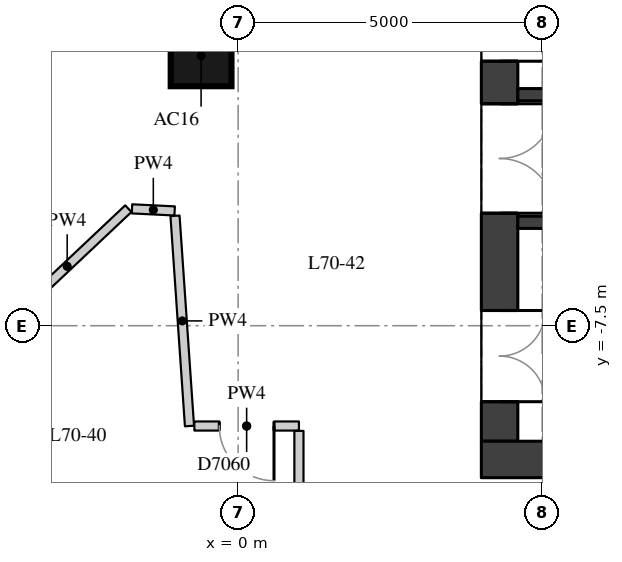
"""IFC4 building model, lengths in metres.
Left out: names, types, materials, properties, quantities, classifications, styles, units other than length and angle.
Written with IfcOpenShell. Run it as: python <this file> out.ifc"""

import sys

from ifc_helpers import new_model, si_unit, direction, frame, frame_2d, origin, origin_2d, place, context, subcontext, project, spatial, rectangle, extrude, element, fill, save


model = new_model("IFC4")
c1 = context("Model", 3, precision=1e-05, world=origin(), true_north=direction((0.0, 1.0)))
c2 = subcontext(c1, "Body", "Model", "MODEL_VIEW")
j1 = project(units=[si_unit("LENGTHUNIT", "METRE"), si_unit("PLANEANGLEUNIT", "RADIAN")], contexts=[c1])
p1 = place(None, origin())
s1 = spatial("IfcSite", under=j1, at=p1, CompositionType="ELEMENT")
p2 = place(p1, origin())
s2 = spatial("IfcBuilding", under=s1, at=p2, CompositionType="ELEMENT")
p3 = place(p2, frame((0.0, 0.0, 246.5)))
s3 = spatial("IfcBuildingStorey", under=s2, at=p3, CompositionType="ELEMENT", Elevation=246.5)
p4 = place(p3, frame((-0.609, -3.062, 0.0), z_axis=(0.0, 0.0, 1.0), x_axis=(1.0, 0.0, 0.0)))
e1 = element("IfcColumn", 1, at=p4, inside=s3, PredefinedType="COLUMN", context=c2, shape_type="SweptSolid", body=[
    extrude(rectangle(XDim=1.0, YDim=1.0, at=origin_2d()), origin(), (0.0, 0.0, 1.0), 3.3),
])
p5 = place(p3, frame((4.3, -9.4, 0.0), z_axis=(0.0, 0.0, 1.0), x_axis=(0.0, 1.0, 0.0)))
e2 = element("IfcWall", 2, at=p5, inside=s3, PredefinedType="SHEAR", context=c2, shape_type="SweptSolid", body=[
    extrude(rectangle(XDim=18.8, YDim=0.6, at=frame_2d((9.4, 0.0))), origin(), (0.0, 0.0, 1.0), 3.02),
])
p6 = place(p5, frame((0.65, 0.0, 0.0)))
e3 = element("IfcOpeningElement", 3, at=p6, cuts=e2, PredefinedType="OPENING", context=c2, shape_type="SweptSolid", body=[
    extrude(rectangle(XDim=1.5, YDim=2.1, at=frame_2d((0.75, 1.05))), frame((0.0, 0.31, 0.0), z_axis=(0.0, -1.0, 0.0), x_axis=(1.0, 0.0, 0.0)), (0.0, 0.0, 1.0), 0.62),
])
p7 = place(p5, frame((3.75, 0.0, 0.0)))
e4 = element("IfcOpeningElement", 4, at=p7, cuts=e2, PredefinedType="OPENING", context=c2, shape_type="SweptSolid", body=[
    extrude(rectangle(XDim=1.8, YDim=2.1, at=frame_2d((0.9, 1.05))), frame((0.0, 0.31, 0.0), z_axis=(0.0, -1.0, 0.0), x_axis=(1.0, 0.0, 0.0)), (0.0, 0.0, 1.0), 0.62),
])
p8 = place(p5, frame((6.25, 0.0, 0.0)))
e5 = element("IfcOpeningElement", 5, at=p8, cuts=e2, PredefinedType="OPENING", context=c2, shape_type="SweptSolid", body=[
    extrude(rectangle(XDim=1.1, YDim=2.1, at=frame_2d((0.55, 1.05))), frame((0.0, 0.31, 0.0), z_axis=(0.0, -1.0, 0.0), x_axis=(1.0, 0.0, 0.0)), (0.0, 0.0, 1.0), 0.62),
])
p9 = place(p5, frame((8.9, 0.0, 0.0)))
e6 = element("IfcOpeningElement", 6, at=p9, cuts=e2, PredefinedType="OPENING", context=c2, shape_type="SweptSolid", body=[
    extrude(rectangle(XDim=1.0, YDim=2.1, at=frame_2d((0.5, 1.05))), frame((0.0, 0.31, 0.0), z_axis=(0.0, -1.0, 0.0), x_axis=(1.0, 0.0, 0.0)), (0.0, 0.0, 1.0), 0.62),
])
p10 = place(p5, frame((11.45, 0.0, 0.0)))
e7 = element("IfcOpeningElement", 7, at=p10, cuts=e2, PredefinedType="OPENING", context=c2, shape_type="SweptSolid", body=[
    extrude(rectangle(XDim=1.1, YDim=2.1, at=frame_2d((0.55, 1.05))), frame((0.0, 0.31, 0.0), z_axis=(0.0, -1.0, 0.0), x_axis=(1.0, 0.0, 0.0)), (0.0, 0.0, 1.0), 0.62),
])
p11 = place(p5, frame((13.25, 0.0, 0.0)))
e8 = element("IfcOpeningElement", 8, at=p11, cuts=e2, PredefinedType="OPENING", context=c2, shape_type="SweptSolid", body=[
    extrude(rectangle(XDim=1.8, YDim=2.1, at=frame_2d((0.9, 1.05))), frame((0.0, 0.31, 0.0), z_axis=(0.0, -1.0, 0.0), x_axis=(1.0, 0.0, 0.0)), (0.0, 0.0, 1.0), 0.62),
])
p12 = place(p5, frame((16.65, 0.0, 0.0)))
e9 = element("IfcOpeningElement", 9, at=p12, cuts=e2, PredefinedType="OPENING", context=c2, shape_type="SweptSolid", body=[
    extrude(rectangle(XDim=1.5, YDim=2.1, at=frame_2d((0.75, 1.05))), frame((0.0, 0.31, 0.0), z_axis=(0.0, -1.0, 0.0), x_axis=(1.0, 0.0, 0.0)), (0.0, 0.0, 1.0), 0.62),
])
p13 = place(p3, frame((4.0, -9.7, 0.0), z_axis=(0.0, 0.0, 1.0), x_axis=(1.0, 0.0, 0.0)))
e10 = element("IfcWall", 10, at=p13, inside=s3, PredefinedType="SHEAR", context=c2, shape_type="SweptSolid", body=[
    extrude(rectangle(XDim=12.0, YDim=0.6, at=frame_2d((6.0, 0.0))), origin(), (0.0, 0.0, 1.0), 3.02),
])
p14 = place(p3, frame((4.6, -3.7, 0.0), z_axis=(0.0, 0.0, 1.0), x_axis=(1.0, 0.0, 0.0)))
e11 = element("IfcWall", 11, at=p14, inside=s3, PredefinedType="SHEAR", context=c2, shape_type="SweptSolid", body=[
    extrude(rectangle(XDim=10.8, YDim=0.2, at=frame_2d((5.4, 0.0))), origin(), (0.0, 0.0, 1.0), 3.02),
])
p15 = place(p14, frame((6.6, 0.0, 0.0)))
e12 = element("IfcOpeningElement", 12, at=p15, cuts=e11, PredefinedType="OPENING", context=c2, shape_type="SweptSolid", body=[
    extrude(rectangle(XDim=1.1, YDim=2.1, at=frame_2d((0.55, 1.05))), frame((0.0, 0.11, 0.0), z_axis=(0.0, -1.0, 0.0), x_axis=(1.0, 0.0, 0.0)), (0.0, 0.0, 1.0), 0.22),
])
p16 = place(p14, frame((8.9, 0.0, 0.0)))
e13 = element("IfcOpeningElement", 13, at=p16, cuts=e11, PredefinedType="OPENING", context=c2, shape_type="SweptSolid", body=[
    extrude(rectangle(XDim=1.1, YDim=2.1, at=frame_2d((0.55, 1.05))), frame((0.0, 0.11, 0.0), z_axis=(0.0, -1.0, 0.0), x_axis=(1.0, 0.0, 0.0)), (0.0, 0.0, 1.0), 0.22),
])
p17 = place(p3, frame((4.6, -5.8, 0.0), z_axis=(0.0, 0.0, 1.0), x_axis=(1.0, 0.0, 0.0)))
e14 = element("IfcWall", 14, at=p17, inside=s3, PredefinedType="SHEAR", context=c2, shape_type="SweptSolid", body=[
    extrude(rectangle(XDim=10.8, YDim=0.2, at=frame_2d((5.4, 0.0))), origin(), (0.0, 0.0, 1.0), 3.02),
])
p18 = place(p3, frame((-3.817, -7.472, 0.0), z_axis=(0.0, 0.0, 1.0), x_axis=(0.727554143834, 0.686050266227, 0.0)))
e15 = element("IfcWall", 15, at=p18, inside=s3, PredefinedType="PARTITIONING", context=c2, shape_type="SweptSolid", body=[
    extrude(rectangle(XDim=2.765, YDim=0.15, at=frame_2d((1.382, 0.0))), origin(), (0.0, 0.0, 1.0), 3.02),
])
p19 = place(p3, frame((-1.746, -5.578, 0.0), z_axis=(0.0, 0.0, 1.0), x_axis=(0.998798699726, -0.049001606354, 0.0)))
e16 = element("IfcWall", 16, at=p19, inside=s3, PredefinedType="PARTITIONING", context=c2, shape_type="SweptSolid", body=[
    extrude(rectangle(XDim=0.702, YDim=0.15, at=frame_2d((0.351, 0.0))), origin(), (0.0, 0.0, 1.0), 3.02),
])
p20 = place(p3, frame((-1.038, -5.693, 0.0), z_axis=(0.0, 0.0, 1.0), x_axis=(0.068688454557, -0.997638158959, 0.0)))
e17 = element("IfcWall", 17, at=p20, inside=s3, PredefinedType="PARTITIONING", context=c2, shape_type="SweptSolid", body=[
    extrude(rectangle(XDim=3.466, YDim=0.15, at=frame_2d((1.733, 0.0))), origin(), (0.0, 0.0, 1.0), 3.02),
])
p21 = place(p3, frame((-0.72, -9.15, 0.0), z_axis=(0.0, 0.0, 1.0), x_axis=(1.0, 0.0, 0.0)))
e18 = element("IfcWall", 18, at=p21, inside=s3, PredefinedType="PARTITIONING", context=c2, shape_type="SweptSolid", body=[
    extrude(rectangle(XDim=1.72, YDim=0.15, at=frame_2d((0.86, 0.0))), origin(), (0.0, 0.0, 1.0), 3.02),
])
p22 = place(p21, frame((0.41, 0.0, 0.0)))
e19 = element("IfcOpeningElement", 19, at=p22, cuts=e18, PredefinedType="OPENING", context=c2, shape_type="SweptSolid", body=[
    extrude(rectangle(XDim=0.9, YDim=2.1, at=frame_2d((0.45, 1.05))), frame((0.0, 0.085, 0.0), z_axis=(0.0, -1.0, 0.0), x_axis=(1.0, 0.0, 0.0)), (0.0, 0.0, 1.0), 0.17),
])
p23 = place(p3, frame((1.0, -9.23, 0.0), z_axis=(0.0, 0.0, 1.0), x_axis=(0.0, -1.0, 0.0)))
e20 = element("IfcWall", 20, at=p23, inside=s3, PredefinedType="PARTITIONING", context=c2, shape_type="SweptSolid", body=[
    extrude(rectangle(XDim=2.283, YDim=0.15, at=frame_2d((1.142, 0.0))), origin(), (0.0, 0.0, 1.0), 3.02),
])
p24 = place(p3, frame((-2.446, 0.0, 0.0), z_axis=(0.0, 0.0, 1.0), x_axis=(-0.382730523909, -0.923860025149, 0.0)))
e21 = element("IfcWall", 21, at=p24, inside=s3, PredefinedType="PARTITIONING", context=c2, shape_type="SweptSolid", body=[
    extrude(rectangle(XDim=4.251, YDim=0.1, at=frame_2d((2.125, 0.0))), origin(), (0.0, 0.0, 1.0), 3.02),
])
p25 = place(p6, origin())
e22 = element("IfcDoor", 22, at=p25, inside=s3, OperationType="DOUBLE_DOOR_SINGLE_SWING", PredefinedType="DOOR", context=c2, shape_type="SweptSolid", body=[
    extrude(rectangle(XDim=1.5, YDim=2.1, at=frame_2d((0.75, 1.05))), frame((0.0, 0.025, 0.0), z_axis=(0.0, -1.0, 0.0), x_axis=(1.0, 0.0, 0.0)), (0.0, 0.0, 1.0), 0.05),
])
fill(e3, e22)
p26 = place(p7, origin())
e23 = element("IfcDoor", 23, at=p26, inside=s3, OperationType="DOUBLE_DOOR_SINGLE_SWING", PredefinedType="DOOR", context=c2, shape_type="SweptSolid", body=[
    extrude(rectangle(XDim=1.8, YDim=2.1, at=frame_2d((0.9, 1.05))), frame((0.0, 0.025, 0.0), z_axis=(0.0, -1.0, 0.0), x_axis=(1.0, 0.0, 0.0)), (0.0, 0.0, 1.0), 0.05),
])
fill(e4, e23)
p27 = place(p8, origin())
e24 = element("IfcDoor", 24, at=p27, inside=s3, OperationType="SINGLE_SWING_RIGHT", PredefinedType="DOOR", context=c2, shape_type="SweptSolid", body=[
    extrude(rectangle(XDim=1.1, YDim=2.1, at=frame_2d((0.55, 1.05))), frame((0.0, 0.025, 0.0), z_axis=(0.0, -1.0, 0.0), x_axis=(1.0, 0.0, 0.0)), (0.0, 0.0, 1.0), 0.05),
])
fill(e5, e24)
p28 = place(p22, origin())
e25 = element("IfcDoor", 25, at=p28, inside=s3, OperationType="SINGLE_SWING_LEFT", PredefinedType="DOOR", context=c2, shape_type="SweptSolid", body=[
    extrude(rectangle(XDim=0.9, YDim=2.1, at=frame_2d((0.45, 1.05))), frame((0.0, 0.025, 0.0), z_axis=(0.0, -1.0, 0.0), x_axis=(1.0, 0.0, 0.0)), (0.0, 0.0, 1.0), 0.05),
])
fill(e19, e25)
save(model, sys.argv[1])
